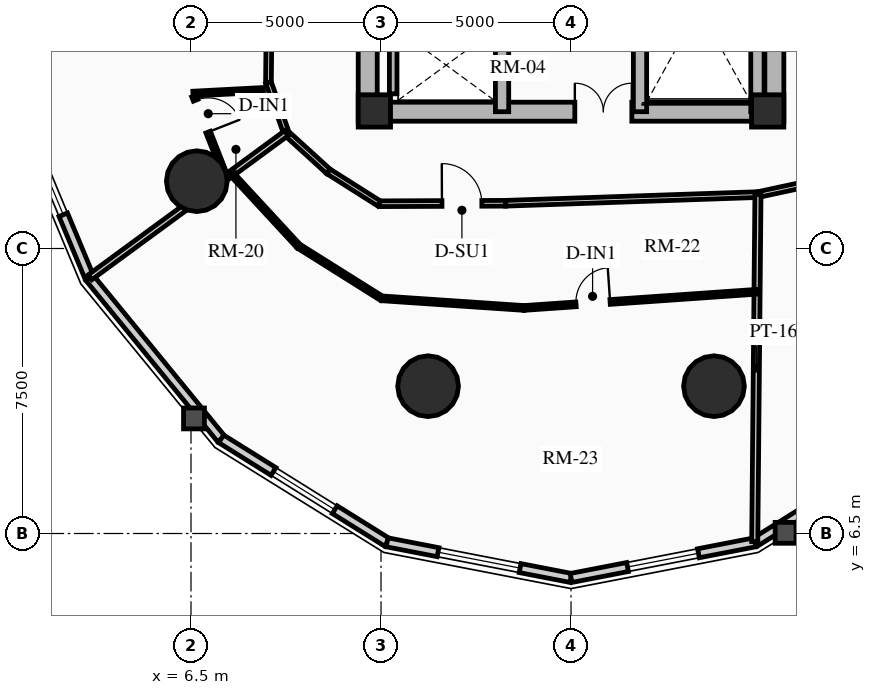
"""IFC4 building model, lengths in metres.
Left out: names, types, materials, properties, quantities, classifications, styles, units other than length and angle.
Written with IfcOpenShell. Run it as: python <this file> out.ifc"""

import sys

from ifc_helpers import new_model, si_unit, direction, frame, frame_2d, origin, origin_2d, place, context, subcontext, project, spatial, rectangle, circle, extrude, source, transform, mapped, element, fill, save


model = new_model("IFC4")
c1 = context("Model", 3, precision=1e-05, world=origin(), true_north=direction((0.0, 1.0)))
c2 = subcontext(c1, "Body", "Model", "MODEL_VIEW")
j1 = project(units=[si_unit("LENGTHUNIT", "METRE"), si_unit("PLANEANGLEUNIT", "RADIAN")], contexts=[c1])
p1 = place(None, origin())
s1 = spatial("IfcSite", under=j1, at=p1, CompositionType="ELEMENT")
p2 = place(p1, origin())
s2 = spatial("IfcBuilding", under=s1, at=p2, CompositionType="ELEMENT")
p3 = place(p2, frame((0.0, 0.0, 54.01)))
s3 = spatial("IfcBuildingStorey", under=s2, at=p3, CompositionType="ELEMENT", Elevation=54.01)
for number, where, z_axis, x_axis in (
    (1, (11.15, 17.35, 0.0), (0.0, 0.0, 1.0), (0.0, 1.0, 0.0)),
    (2, (21.85, 17.35, 0.0), (0.0, 0.0, 1.0), (0.0, 1.0, 0.0)),
):
    element("IfcWall", number, at=place(p3, frame(where, z_axis=z_axis, x_axis=x_axis)), inside=s3, PredefinedType="SHEAR", context=c2, shape_type="SweptSolid", body=[
        extrude(rectangle(XDim=14.3, YDim=0.5, at=frame_2d((7.15, 0.0))), origin(), (0.0, 0.0, 1.0), 2.91),
    ])
p4 = place(p3, frame((11.15, 17.6, 0.0), z_axis=(0.0, 0.0, 1.0), x_axis=(1.0, 0.0, 0.0)))
e3 = element("IfcWall", 3, at=p4, inside=s3, PredefinedType="SHEAR", context=c2, shape_type="SweptSolid", body=[
    extrude(rectangle(XDim=10.7, YDim=0.5, at=frame_2d((5.35, 0.0))), origin(), (0.0, 0.0, 1.0), 2.91),
])
m1 = source(origin(), c2, "Body", "SweptSolid", [
    extrude(rectangle(XDim=1.5, YDim=2.02, at=frame_2d((0.75, 1.01))), frame((0.0, 0.26, 0.0), z_axis=(0.0, -1.0, 0.0), x_axis=(1.0, 0.0, 0.0)), (0.0, 0.0, 1.0), 0.52),
])
p5 = place(p4, frame((5.45, 0.0, 0.0)))
e4 = element("IfcOpeningElement", 4, at=p5, cuts=e3, PredefinedType="OPENING", context=c2, shape_type="MappedRepresentation", body=[
    mapped(m1, transform((0.0, 0.0, 0.0), x_axis=(1.0, 0.0, 0.0), y_axis=(0.0, 1.0, 0.0), z_axis=(0.0, 0.0, 1.0), scale=1.0)),
])
p6 = place(p3, frame((14.685, 17.6, 0.0), z_axis=(0.0, 0.0, 1.0), x_axis=(0.0, 1.0, 0.0)))
e5 = element("IfcWall", 5, at=p6, inside=s3, PredefinedType="SHEAR", context=c2, shape_type="SweptSolid", body=[
    extrude(rectangle(XDim=13.8, YDim=0.35, at=frame_2d((6.9, 0.0))), origin(), (0.0, 0.0, 1.0), 2.91),
])
m2 = source(origin(), c2, "Body", "SweptSolid", [
    extrude(rectangle(XDim=1.1, YDim=2.015, at=frame_2d((0.55, 1.007))), frame((0.0, 0.185, 0.0), z_axis=(0.0, -1.0, 0.0), x_axis=(1.0, 0.0, 0.0)), (0.0, 0.0, 1.0), 0.37),
])
p7 = place(p6, frame((4.9, 0.0, 0.0)))
e6 = element("IfcOpeningElement", 6, at=p7, cuts=e5, PredefinedType="OPENING", context=c2, shape_type="MappedRepresentation", body=[
    mapped(m2, transform((0.0, 0.0, 0.0), x_axis=(1.0, 0.0, 0.0), y_axis=(0.0, 1.0, 0.0), z_axis=(0.0, 0.0, 1.0), scale=1.0)),
])
m3 = source(origin(), c2, "Body", "SweptSolid", [
    extrude(rectangle(XDim=1.15, YDim=2.02, at=frame_2d((0.575, 1.01))), frame((0.0, 0.185, 0.0), z_axis=(0.0, -1.0, 0.0), x_axis=(1.0, 0.0, 0.0)), (0.0, 0.0, 1.0), 0.37),
])
p8 = place(p6, frame((7.32, 0.0, 0.0)))
e7 = element("IfcOpeningElement", 7, at=p8, cuts=e5, PredefinedType="OPENING", context=c2, shape_type="MappedRepresentation", body=[
    mapped(m3, transform((0.0, 0.0, 0.0), x_axis=(1.0, 0.0, 0.0), y_axis=(0.0, 1.0, 0.0), z_axis=(0.0, 0.0, 1.0), scale=1.0)),
])
p9 = place(p3, frame((18.315, 17.6, 0.0), z_axis=(0.0, 0.0, 1.0), x_axis=(0.0, 1.0, 0.0)))
e8 = element("IfcWall", 8, at=p9, inside=s3, PredefinedType="SHEAR", context=c2, shape_type="SweptSolid", body=[
    extrude(rectangle(XDim=13.8, YDim=0.35, at=frame_2d((6.9, 0.0))), origin(), (0.0, 0.0, 1.0), 2.91),
])
p10 = place(p9, frame((10.025, 0.0, 0.0)))
e9 = element("IfcOpeningElement", 9, at=p10, cuts=e8, PredefinedType="OPENING", context=c2, shape_type="MappedRepresentation", body=[
    mapped(m2, transform((0.0, 0.0, 0.0), x_axis=(1.0, 0.0, 0.0), y_axis=(0.0, 1.0, 0.0), z_axis=(0.0, 0.0, 1.0), scale=1.0)),
])
p11 = place(p9, frame((12.025, 0.0, 0.0)))
e10 = element("IfcOpeningElement", 10, at=p11, cuts=e8, PredefinedType="OPENING", context=c2, shape_type="MappedRepresentation", body=[
    mapped(m2, transform((0.0, 0.0, 0.0), x_axis=(1.0, 0.0, 0.0), y_axis=(0.0, 1.0, 0.0), z_axis=(0.0, 0.0, 1.0), scale=1.0)),
])
p12 = place(p9, frame((5.33, 0.0, 0.0)))
e11 = element("IfcOpeningElement", 11, at=p12, cuts=e8, PredefinedType="OPENING", context=c2, shape_type="MappedRepresentation", body=[
    mapped(m3, transform((0.0, 0.0, 0.0), x_axis=(1.0, 0.0, 0.0), y_axis=(0.0, 1.0, 0.0), z_axis=(0.0, 0.0, 1.0), scale=1.0)),
])
p13 = place(p3, frame((21.405, 17.6, 0.0), z_axis=(0.0, 0.0, 1.0), x_axis=(0.0, 1.0, 0.0)))
e12 = element("IfcWall", 12, at=p13, inside=s3, PredefinedType="SHEAR", context=c2, shape_type="SweptSolid", body=[
    extrude(rectangle(XDim=6.745, YDim=0.35, at=frame_2d((3.373, 0.0))), origin(), (0.0, 0.0, 1.0), 2.91),
])
for number, where, z_axis, x_axis in (
    (13, (11.325, 17.62, 0.0), (0.0, 0.0, 1.0), (1.0, 0.0, 0.0)),
    (14, (21.675, 17.62, 0.0), (0.0, 0.0, 1.0), (1.0, 0.0, 0.0)),
):
    element("IfcColumn", number, at=place(p3, frame(where, z_axis=z_axis, x_axis=x_axis)), inside=s3, PredefinedType="COLUMN", context=c2, shape_type="SweptSolid", body=[
        extrude(rectangle(XDim=0.85, YDim=0.85, at=origin_2d()), origin(), (0.0, 0.0, 1.0), 2.91),
    ])
for number, where, z_axis, x_axis in (
    (15, (6.653, 15.771, 0.0), (0.0, 0.0, 1.0), (1.0, 0.0, 0.0)),
    (16, (12.739, 10.377, 0.0), (0.0, 0.0, 1.0), (1.0, 0.0, 0.0)),
    (17, (20.261, 10.377, 0.0), (0.0, 0.0, 1.0), (1.0, 0.0, 0.0)),
):
    element("IfcColumn", number, at=place(p3, frame(where, z_axis=z_axis, x_axis=x_axis)), inside=s3, PredefinedType="USERDEFINED", context=c2, shape_type="SweptSolid", body=[
        extrude(circle(Radius=0.8, at=origin_2d()), origin(), (0.0, 0.0, 1.0), 2.91),
    ])
p14 = place(p3, frame((3.828, 13.232, 0.0), z_axis=(0.0, 0.0, 1.0), x_axis=(-0.384348836956, 0.923187939442, 0.0)))
e18 = element("IfcWall", 18, at=p14, inside=s3, PredefinedType="SOLIDWALL", context=c2, shape_type="SweptSolid", body=[
    extrude(rectangle(XDim=5.789, YDim=0.24, at=frame_2d((2.894, 0.0))), origin(), (0.0, 0.0, 1.0), 2.073),
])
m4 = source(origin(), c2, "Body", "SweptSolid", [
    extrude(rectangle(XDim=2.2, YDim=1.35, at=frame_2d((1.1, 0.675))), frame((0.0, 0.13, 0.0), z_axis=(0.0, -1.0, 0.0), x_axis=(1.0, 0.0, 0.0)), (0.0, 0.0, 1.0), 0.26),
])
p15 = place(p14, frame((1.794, 0.0, 0.65)))
e19 = element("IfcOpeningElement", 19, at=p15, cuts=e18, PredefinedType="OPENING", context=c2, shape_type="MappedRepresentation", body=[
    mapped(m4, transform((0.0, 0.0, 0.0), x_axis=(1.0, 0.0, 0.0), y_axis=(0.0, 1.0, 0.0), z_axis=(0.0, 0.0, 1.0), scale=1.0)),
])
p16 = place(p3, frame((7.293, 8.991, 0.0), z_axis=(0.0, 0.0, 1.0), x_axis=(-0.632713287022, 0.77438614168, 0.0)))
e20 = element("IfcWall", 20, at=p16, inside=s3, PredefinedType="SOLIDWALL", context=c2, shape_type="SweptSolid", body=[
    extrude(rectangle(XDim=5.477, YDim=0.24, at=frame_2d((2.738, 0.0))), origin(), (0.0, 0.0, 1.0), 2.073),
])
p17 = place(p3, frame((11.66, 6.268, 0.0), z_axis=(0.0, 0.0, 1.0), x_axis=(-0.848533613342, 0.529141481107, 0.0)))
e21 = element("IfcWall", 21, at=p17, inside=s3, PredefinedType="SOLIDWALL", context=c2, shape_type="SweptSolid", body=[
    extrude(rectangle(XDim=5.146, YDim=0.24, at=frame_2d((2.573, 0.0))), origin(), (0.0, 0.0, 1.0), 2.073),
])
m5 = source(origin(), c2, "Body", "SweptSolid", [
    extrude(rectangle(XDim=1.9, YDim=1.35, at=frame_2d((0.95, 0.675))), frame((0.0, 0.13, 0.0), z_axis=(0.0, -1.0, 0.0), x_axis=(1.0, 0.0, 0.0)), (0.0, 0.0, 1.0), 0.26),
])
p18 = place(p17, frame((1.623, 0.0, 0.65)))
e22 = element("IfcOpeningElement", 22, at=p18, cuts=e21, PredefinedType="OPENING", context=c2, shape_type="MappedRepresentation", body=[
    mapped(m5, transform((0.0, 0.0, 0.0), x_axis=(1.0, 0.0, 0.0), y_axis=(0.0, 1.0, 0.0), z_axis=(0.0, 0.0, 1.0), scale=1.0)),
])
p19 = place(p3, frame((16.5, 5.33, 0.0), z_axis=(0.0, 0.0, 1.0), x_axis=(-0.981725274071, 0.190303668512, 0.0)))
e23 = element("IfcWall", 23, at=p19, inside=s3, PredefinedType="SOLIDWALL", context=c2, shape_type="SweptSolid", body=[
    extrude(rectangle(XDim=4.93, YDim=0.24, at=frame_2d((2.465, 0.0))), origin(), (0.0, 0.0, 1.0), 2.073),
])
p20 = place(p19, frame((1.365, 0.0, 0.65)))
e24 = element("IfcOpeningElement", 24, at=p20, cuts=e23, PredefinedType="OPENING", context=c2, shape_type="MappedRepresentation", body=[
    mapped(m4, transform((0.0, 0.0, 0.0), x_axis=(1.0, 0.0, 0.0), y_axis=(0.0, 1.0, 0.0), z_axis=(0.0, 0.0, 1.0), scale=1.0)),
])
p21 = place(p3, frame((21.34, 6.268, 0.0), z_axis=(0.0, 0.0, 1.0), x_axis=(-0.981725274071, -0.190303668512, 0.0)))
e25 = element("IfcWall", 25, at=p21, inside=s3, PredefinedType="SOLIDWALL", context=c2, shape_type="SweptSolid", body=[
    extrude(rectangle(XDim=4.93, YDim=0.24, at=frame_2d((2.465, 0.0))), origin(), (0.0, 0.0, 1.0), 2.073),
])
p22 = place(p21, frame((1.515, 0.0, 0.65)))
e26 = element("IfcOpeningElement", 26, at=p22, cuts=e25, PredefinedType="OPENING", context=c2, shape_type="MappedRepresentation", body=[
    mapped(m5, transform((0.0, 0.0, 0.0), x_axis=(1.0, 0.0, 0.0), y_axis=(0.0, 1.0, 0.0), z_axis=(0.0, 0.0, 1.0), scale=1.0)),
])
p23 = place(p3, frame((25.707, 8.991, 0.0), z_axis=(0.0, 0.0, 1.0), x_axis=(-0.848533613342, -0.529141481107, 0.0)))
e27 = element("IfcWall", 27, at=p23, inside=s3, PredefinedType="SOLIDWALL", context=c2, shape_type="SweptSolid", body=[
    extrude(rectangle(XDim=5.146, YDim=0.24, at=frame_2d((2.573, 0.0))), origin(), (0.0, 0.0, 1.0), 2.073),
])
p24 = place(p3, frame((11.82, 18.07, 0.0), z_axis=(0.0, 0.0, 1.0), x_axis=(0.0, 1.0, 0.0)))
e28 = element("IfcWall", 28, at=p24, inside=s3, PredefinedType="SHEAR", context=c2, shape_type="SweptSolid", body=[
    extrude(rectangle(XDim=1.635, YDim=0.2, at=frame_2d((0.817, 0.0))), origin(), (0.0, 0.0, 1.0), 2.91),
])
p25 = place(p3, frame((8.6, 24.5, 0.0), z_axis=(0.0, 0.0, 1.0), x_axis=(-0.010076760723, -0.999949228158, 0.0)))
e29 = element("IfcWall", 29, at=p25, inside=s3, PredefinedType="PARTITIONING", context=c2, shape_type="SweptSolid", body=[
    extrude(rectangle(XDim=6.13, YDim=0.15, at=frame_2d((3.065, 0.0))), origin(), (0.0, 0.0, 1.0), 2.159),
])
m6 = source(origin(), c2, "Body", "SweptSolid", [
    extrude(rectangle(XDim=1.05, YDim=2.015, at=frame_2d((0.525, 1.007))), frame((0.0, 0.085, 0.0), z_axis=(0.0, -1.0, 0.0), x_axis=(1.0, 0.0, 0.0)), (0.0, 0.0, 1.0), 0.17),
])
p26 = place(p25, frame((2.54, 0.0, 0.0)))
e30 = element("IfcOpeningElement", 30, at=p26, cuts=e29, PredefinedType="OPENING", context=c2, shape_type="MappedRepresentation", body=[
    mapped(m6, transform((0.0, 0.0, 0.0), x_axis=(1.0, 0.0, 0.0), y_axis=(0.0, 1.0, 0.0), z_axis=(0.0, 0.0, 1.0), scale=1.0)),
])
p27 = place(p3, frame((8.538, 18.371, 0.0), z_axis=(0.0, 0.0, 1.0), x_axis=(0.3330273821, -0.942917155837, 0.0)))
e31 = element("IfcWall", 31, at=p27, inside=s3, PredefinedType="PARTITIONING", context=c2, shape_type="SweptSolid", body=[
    extrude(rectangle(XDim=1.417, YDim=0.15, at=frame_2d((0.708, 0.0))), origin(), (0.0, 0.0, 1.0), 2.205),
])
p28 = place(p3, frame((9.01, 17.034, 0.0), z_axis=(0.0, 0.0, 1.0), x_axis=(0.739733009791, -0.672900493554, 0.0)))
e32 = element("IfcWall", 32, at=p28, inside=s3, PredefinedType="PARTITIONING", context=c2, shape_type="SweptSolid", body=[
    extrude(rectangle(XDim=1.494, YDim=0.15, at=frame_2d((0.747, 0.0))), origin(), (0.0, 0.0, 1.0), 2.159),
])
p29 = place(p3, frame((10.115, 16.029, 0.0), z_axis=(0.0, 0.0, 1.0), x_axis=(0.844897677802, -0.534927952201, 0.0)))
e33 = element("IfcWall", 33, at=p29, inside=s3, PredefinedType="PARTITIONING", context=c2, shape_type="SweptSolid", body=[
    extrude(rectangle(XDim=1.591, YDim=0.15, at=frame_2d((0.795, 0.0))), origin(), (0.0, 0.0, 1.0), 2.205),
])
p30 = place(p3, frame((11.46, 15.178, 0.0), z_axis=(0.0, 0.0, 1.0), x_axis=(0.999992694689, 0.003822377251, 0.0)))
e34 = element("IfcWall", 34, at=p30, inside=s3, PredefinedType="PARTITIONING", context=c2, shape_type="SweptSolid", body=[
    extrude(rectangle(XDim=3.321, YDim=0.15, at=frame_2d((1.661, 0.0))), origin(), (0.0, 0.0, 1.0), 2.159),
])
p31 = place(p30, frame((1.643, 0.0, 0.0)))
e35 = element("IfcOpeningElement", 35, at=p31, cuts=e34, PredefinedType="OPENING", context=c2, shape_type="MappedRepresentation", body=[
    mapped(m6, transform((0.0, 0.0, 0.0), x_axis=(1.0, 0.0, 0.0), y_axis=(0.0, 1.0, 0.0), z_axis=(0.0, 0.0, 1.0), scale=1.0)),
])
p32 = place(p3, frame((14.781, 15.191, 0.0), z_axis=(0.0, 0.0, 1.0), x_axis=(0.999412963972, 0.034259705842, 0.0)))
e36 = element("IfcWall", 36, at=p32, inside=s3, PredefinedType="PARTITIONING", context=c2, shape_type="SweptSolid", body=[
    extrude(rectangle(XDim=6.642, YDim=0.15, at=frame_2d((3.321, 0.0))), origin(), (0.0, 0.0, 1.0), 2.159),
])
p33 = place(p3, frame((21.419, 15.418, 0.0), z_axis=(0.0, 0.0, 1.0), x_axis=(0.977540384091, 0.210748184977, 0.0)))
e37 = element("IfcWall", 37, at=p33, inside=s3, PredefinedType="PARTITIONING", context=c2, shape_type="SweptSolid", body=[
    extrude(rectangle(XDim=1.887, YDim=0.15, at=frame_2d((0.944, 0.0))), origin(), (0.0, 0.0, 1.0), 2.205),
])
p34 = place(p3, frame((9.01, 17.034, 0.0), z_axis=(0.0, 0.0, 1.0), x_axis=(-0.806234156757, -0.591596555499, 0.0)))
e38 = element("IfcWall", 38, at=p34, inside=s3, PredefinedType="PARTITIONING", context=c2, shape_type="SweptSolid", body=[
    extrude(rectangle(XDim=6.407, YDim=0.16, at=frame_2d((3.204, 0.0))), origin(), (0.0, 0.0, 1.0), 2.073),
])
p35 = place(p3, frame((21.419, 15.418, 0.0), z_axis=(0.0, 0.0, 1.0), x_axis=(-0.009277675551, -0.999956961442, 0.0)))
e39 = element("IfcWall", 39, at=p35, inside=s3, PredefinedType="PARTITIONING", context=c2, shape_type="SweptSolid", body=[
    extrude(rectangle(XDim=9.131, YDim=0.16, at=frame_2d((4.566, 0.0))), origin(), (0.0, 0.0, 1.0), 2.073),
])
p36 = place(p3, frame((8.404, 18.173, 0.0), z_axis=(0.0, 0.0, 1.0), x_axis=(-0.998640999178, -0.052116741655, 0.0)))
e40 = element("IfcWall", 40, at=p36, inside=s3, PredefinedType="PARTITIONING", context=c2, shape_type="SweptSolid", body=[
    extrude(rectangle(XDim=1.855, YDim=0.125, at=frame_2d((0.927, 0.0))), origin(), (0.0, 0.0, 1.0), 2.205),
])
p37 = place(p3, frame((6.577, 18.012, 0.0), z_axis=(0.0, 0.0, 1.0), x_axis=(0.366179258149, -0.930544330433, 0.0)))
e41 = element("IfcWall", 41, at=p37, inside=s3, PredefinedType="PARTITIONING", context=c2, shape_type="SweptSolid", body=[
    extrude(rectangle(XDim=2.208, YDim=0.125, at=frame_2d((1.104, 0.0))), origin(), (0.0, 0.0, 1.0), 2.159),
])
m7 = source(origin(), c2, "Body", "SweptSolid", [
    extrude(rectangle(XDim=0.9, YDim=2.005, at=frame_2d((0.45, 1.002))), frame((0.0, 0.073, 0.0), z_axis=(0.0, -1.0, 0.0), x_axis=(1.0, 0.0, 0.0)), (0.0, 0.0, 1.0), 0.145),
])
p38 = place(p37, frame((0.12, 0.0, 0.0)))
e42 = element("IfcOpeningElement", 42, at=p38, cuts=e41, PredefinedType="OPENING", context=c2, shape_type="MappedRepresentation", body=[
    mapped(m7, transform((0.0, 0.0, 0.0), x_axis=(1.0, 0.0, 0.0), y_axis=(0.0, 1.0, 0.0), z_axis=(0.0, 0.0, 1.0), scale=1.0)),
])
p39 = place(p3, frame((7.564, 15.973, 0.0), z_axis=(0.0, 0.0, 1.0), x_axis=(0.678576389573, -0.734529838409, 0.0)))
e43 = element("IfcWall", 43, at=p39, inside=s3, PredefinedType="PARTITIONING", context=c2, shape_type="SweptSolid", body=[
    extrude(rectangle(XDim=2.601, YDim=0.125, at=frame_2d((1.3, 0.0))), origin(), (0.0, 0.0, 1.0), 2.635),
])
p40 = place(p3, frame((9.329, 14.063, 0.0), z_axis=(0.0, 0.0, 1.0), x_axis=(0.846882074778, -0.531780736225, 0.0)))
e44 = element("IfcWall", 44, at=p40, inside=s3, PredefinedType="PARTITIONING", context=c2, shape_type="SweptSolid", body=[
    extrude(rectangle(XDim=2.585, YDim=0.125, at=frame_2d((1.292, 0.0))), origin(), (0.0, 0.0, 1.0), 2.205),
])
p41 = place(p3, frame((11.518, 12.688, 0.0), z_axis=(0.0, 0.0, 1.0), x_axis=(0.997722259414, -0.067455860152, 0.0)))
e45 = element("IfcWall", 45, at=p41, inside=s3, PredefinedType="PARTITIONING", context=c2, shape_type="SweptSolid", body=[
    extrude(rectangle(XDim=3.753, YDim=0.125, at=frame_2d((1.876, 0.0))), origin(), (0.0, 0.0, 1.0), 2.159),
])
p42 = place(p3, frame((15.262, 12.435, 0.0), z_axis=(0.0, 0.0, 1.0), x_axis=(0.997593149667, 0.069339077998, 0.0)))
e46 = element("IfcWall", 46, at=p42, inside=s3, PredefinedType="PARTITIONING", context=c2, shape_type="SweptSolid", body=[
    extrude(rectangle(XDim=6.148, YDim=0.125, at=frame_2d((3.074, 0.0))), origin(), (0.0, 0.0, 1.0), 2.159),
])
p43 = place(p42, frame((1.372, 0.0, 0.0)))
e47 = element("IfcOpeningElement", 47, at=p43, cuts=e46, PredefinedType="OPENING", context=c2, shape_type="MappedRepresentation", body=[
    mapped(m7, transform((0.0, 0.0, 0.0), x_axis=(1.0, 0.0, 0.0), y_axis=(0.0, 1.0, 0.0), z_axis=(0.0, 0.0, 1.0), scale=1.0)),
])
m8 = source(origin(), c2, "Body", "SweptSolid", [
    extrude(rectangle(XDim=2.2, YDim=1.35, at=frame_2d((1.1, 0.675))), frame((0.0, 0.03, 0.0), z_axis=(0.0, -1.0, 0.0), x_axis=(1.0, 0.0, 0.0)), (0.0, 0.0, 1.0), 0.06),
])
p44 = place(p15, origin())
e48 = element("IfcWindow", 48, at=p44, inside=s3, PartitioningType="DOUBLE_PANEL_VERTICAL", PredefinedType="WINDOW", context=c2, shape_type="MappedRepresentation", body=[
    mapped(m8, transform((0.0, 0.0, 0.0), x_axis=(1.0, 0.0, 0.0), y_axis=(0.0, 1.0, 0.0), z_axis=(0.0, 0.0, 1.0), scale=1.0)),
])
fill(e19, e48)
m9 = source(origin(), c2, "Body", "SweptSolid", [
    extrude(rectangle(XDim=1.9, YDim=1.35, at=frame_2d((0.95, 0.675))), frame((0.0, 0.03, 0.0), z_axis=(0.0, -1.0, 0.0), x_axis=(1.0, 0.0, 0.0)), (0.0, 0.0, 1.0), 0.06),
])
p45 = place(p18, origin())
e49 = element("IfcWindow", 49, at=p45, inside=s3, PartitioningType="DOUBLE_PANEL_VERTICAL", PredefinedType="WINDOW", context=c2, shape_type="MappedRepresentation", body=[
    mapped(m9, transform((0.0, 0.0, 0.0), x_axis=(1.0, 0.0, 0.0), y_axis=(0.0, 1.0, 0.0), z_axis=(0.0, 0.0, 1.0), scale=1.0)),
])
fill(e22, e49)
p46 = place(p20, origin())
e50 = element("IfcWindow", 50, at=p46, inside=s3, PartitioningType="DOUBLE_PANEL_VERTICAL", PredefinedType="WINDOW", context=c2, shape_type="MappedRepresentation", body=[
    mapped(m8, transform((0.0, 0.0, 0.0), x_axis=(1.0, 0.0, 0.0), y_axis=(0.0, 1.0, 0.0), z_axis=(0.0, 0.0, 1.0), scale=1.0)),
])
fill(e24, e50)
p47 = place(p22, origin())
e51 = element("IfcWindow", 51, at=p47, inside=s3, PartitioningType="DOUBLE_PANEL_VERTICAL", PredefinedType="WINDOW", context=c2, shape_type="MappedRepresentation", body=[
    mapped(m9, transform((0.0, 0.0, 0.0), x_axis=(1.0, 0.0, 0.0), y_axis=(0.0, 1.0, 0.0), z_axis=(0.0, 0.0, 1.0), scale=1.0)),
])
fill(e26, e51)
m10 = source(origin(), c2, "Body", "SweptSolid", [
    extrude(rectangle(XDim=1.5, YDim=2.02, at=frame_2d((0.75, 1.01))), frame((0.0, 0.025, 0.0), z_axis=(0.0, -1.0, 0.0), x_axis=(1.0, 0.0, 0.0)), (0.0, 0.0, 1.0), 0.05),
])
p48 = place(p5, origin())
e52 = element("IfcDoor", 52, at=p48, inside=s3, OperationType="DOUBLE_DOOR_SINGLE_SWING", PredefinedType="DOOR", context=c2, shape_type="MappedRepresentation", body=[
    mapped(m10, transform((0.0, 0.0, 0.0), x_axis=(1.0, 0.0, 0.0), y_axis=(0.0, 1.0, 0.0), z_axis=(0.0, 0.0, 1.0), scale=1.0)),
])
fill(e4, e52)
m11 = source(origin(), c2, "Body", "SweptSolid", [
    extrude(rectangle(XDim=0.9, YDim=2.005, at=frame_2d((0.45, 1.002))), frame((0.0, 0.025, 0.0), z_axis=(0.0, -1.0, 0.0), x_axis=(1.0, 0.0, 0.0)), (0.0, 0.0, 1.0), 0.05),
])
p49 = place(p38, origin())
e53 = element("IfcDoor", 53, at=p49, inside=s3, OperationType="SINGLE_SWING_RIGHT", PredefinedType="DOOR", context=c2, shape_type="MappedRepresentation", body=[
    mapped(m11, transform((0.0, 0.0, 0.0), x_axis=(1.0, 0.0, 0.0), y_axis=(0.0, 1.0, 0.0), z_axis=(0.0, 0.0, 1.0), scale=1.0)),
])
fill(e42, e53)
m12 = source(origin(), c2, "Body", "SweptSolid", [
    extrude(rectangle(XDim=1.05, YDim=2.015, at=frame_2d((0.525, 1.007))), frame((0.0, 0.025, 0.0), z_axis=(0.0, -1.0, 0.0), x_axis=(1.0, 0.0, 0.0)), (0.0, 0.0, 1.0), 0.05),
])
p50 = place(p31, origin())
e54 = element("IfcDoor", 54, at=p50, inside=s3, OperationType="SINGLE_SWING_LEFT", PredefinedType="DOOR", context=c2, shape_type="MappedRepresentation", body=[
    mapped(m12, transform((0.0, 0.0, 0.0), x_axis=(1.0, 0.0, 0.0), y_axis=(0.0, 1.0, 0.0), z_axis=(0.0, 0.0, 1.0), scale=1.0)),
])
fill(e35, e54)
p51 = place(p43, origin())
e55 = element("IfcDoor", 55, at=p51, inside=s3, OperationType="SINGLE_SWING_RIGHT", PredefinedType="DOOR", context=c2, shape_type="MappedRepresentation", body=[
    mapped(m11, transform((0.0, 0.0, 0.0), x_axis=(1.0, 0.0, 0.0), y_axis=(0.0, 1.0, 0.0), z_axis=(0.0, 0.0, 1.0), scale=1.0)),
])
fill(e47, e55)
save(model, sys.argv[1])
